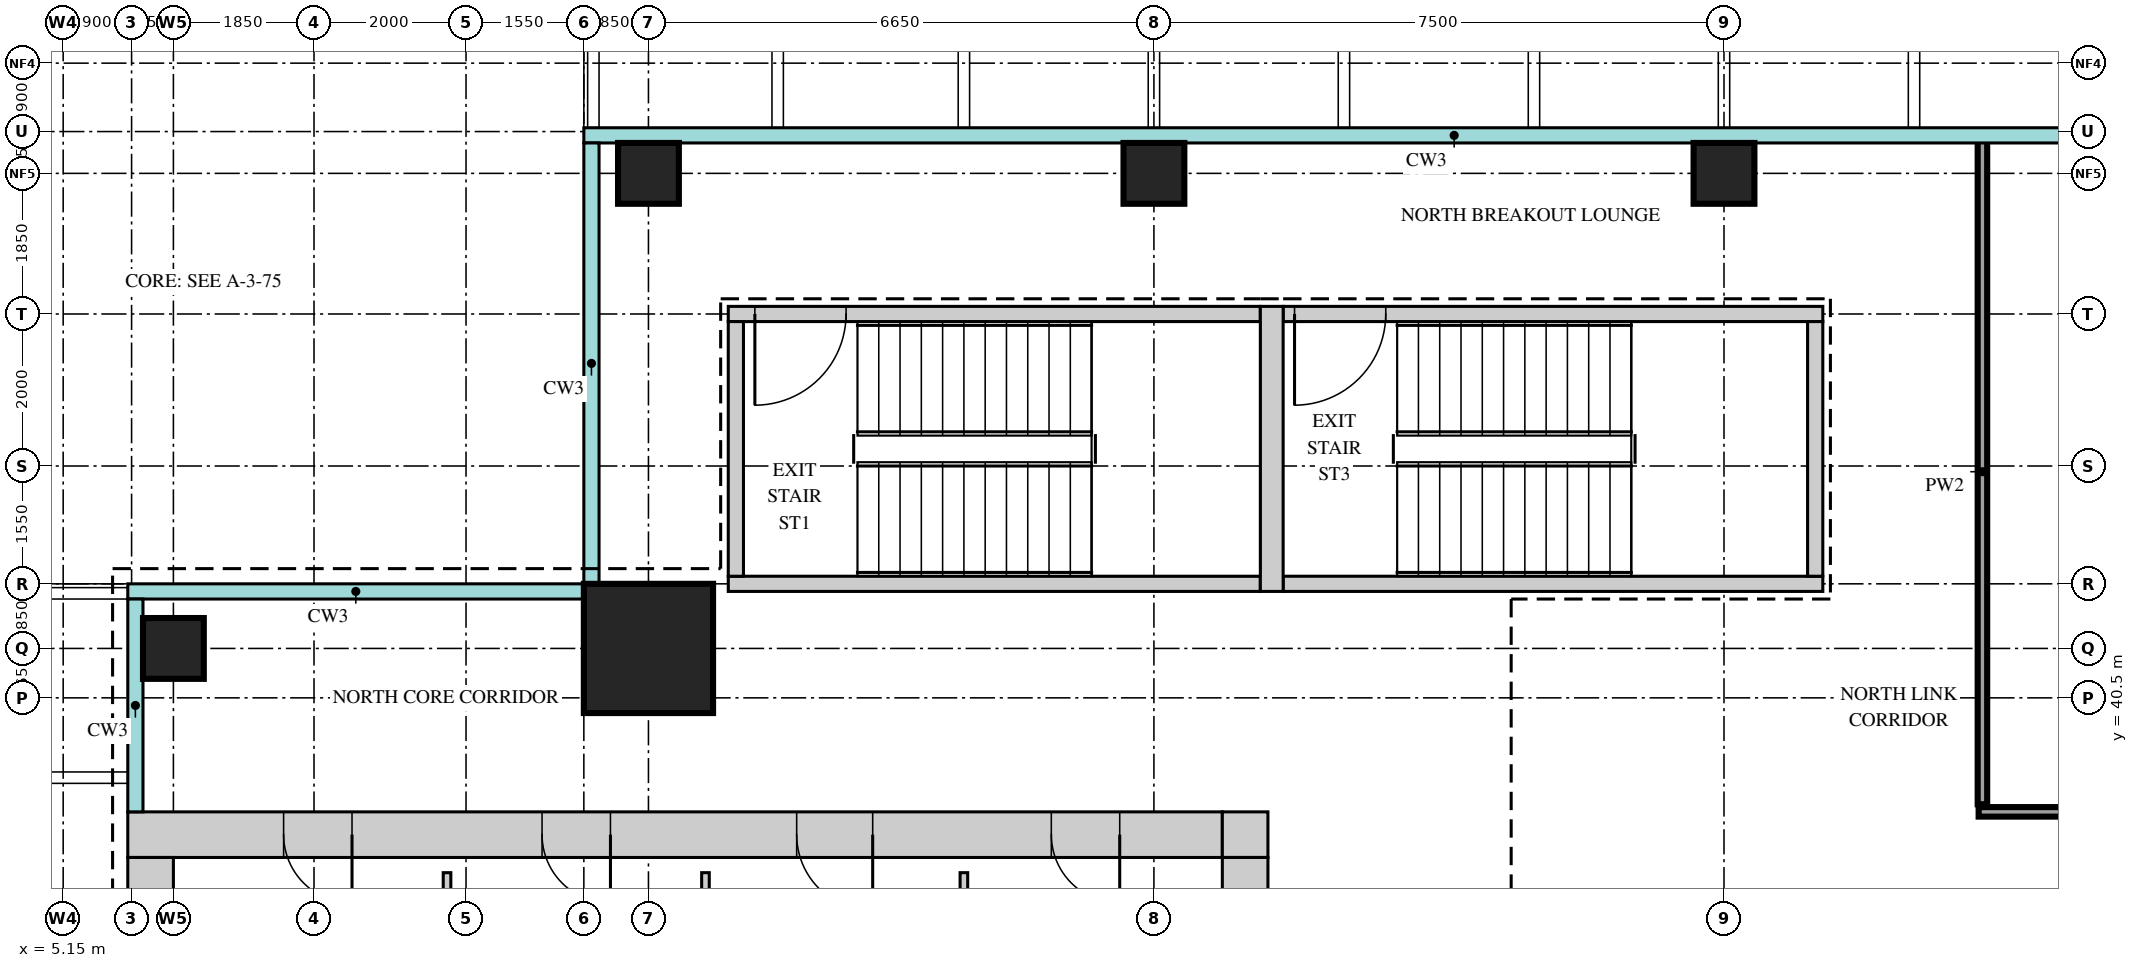
"""IFC4 building model, lengths in metres.
Left out: names, types, materials, properties, quantities, classifications, styles, units other than length and angle.
Written with IfcOpenShell. Run it as: python <this file> out.ifc"""

import sys

from ifc_helpers import new_model, si_unit, direction, frame, frame_2d, origin, origin_2d, place, context, subcontext, project, spatial, rectangle, extrude, source, transform, mapped, element, fill, save


model = new_model("IFC4")
c1 = context("Model", 3, precision=1e-05, world=origin(), true_north=direction((0.0, 1.0)))
c2 = subcontext(c1, "Body", "Model", "MODEL_VIEW")
j1 = project(units=[si_unit("LENGTHUNIT", "METRE"), si_unit("PLANEANGLEUNIT", "RADIAN")], contexts=[c1])
p1 = place(None, origin())
s1 = spatial("IfcSite", under=j1, at=p1, CompositionType="ELEMENT")
p2 = place(p1, origin())
s2 = spatial("IfcBuilding", under=s1, at=p2, CompositionType="ELEMENT")
p3 = place(p2, frame((0.0, 0.0, 318.2)))
s3 = spatial("IfcBuildingStorey", under=s2, at=p3, CompositionType="ELEMENT", Elevation=318.2)
m1 = source(origin(), c2, "Body", "SweptSolid", [
    extrude(rectangle(XDim=14.4, YDim=0.6, at=frame_2d((7.2, 0.0))), origin(), (0.0, 0.0, 1.0), 3.75),
])
p4 = place(p3, frame((6.0, 38.7, 0.0), z_axis=(0.0, 0.0, 1.0), x_axis=(1.0, 0.0, 0.0)))
e1 = element("IfcWall", 1, at=p4, inside=s3, PredefinedType="SHEAR", context=c2, shape_type="MappedRepresentation", body=[
    mapped(m1, transform((0.0, 0.0, 0.0))),
])
m2 = source(origin(), c2, "Body", "SweptSolid", [
    extrude(rectangle(XDim=0.9, YDim=2.1, at=frame_2d((0.45, 1.05))), frame((0.0, 0.31, 0.0), z_axis=(0.0, -1.0, 0.0), x_axis=(1.0, 0.0, 0.0)), (0.0, 0.0, 1.0), 0.62),
])
p5 = place(p4, frame((2.05, 0.0, 0.0)))
e2 = element("IfcOpeningElement", 2, at=p5, cuts=e1, PredefinedType="OPENING", context=c2, shape_type="MappedRepresentation", body=[
    mapped(m2, transform((0.0, 0.0, 0.0))),
])
p6 = place(p4, frame((5.45, 0.0, 0.0)))
e3 = element("IfcOpeningElement", 3, at=p6, cuts=e1, PredefinedType="OPENING", context=c2, shape_type="MappedRepresentation", body=[
    mapped(m2, transform((0.0, 0.0, 0.0))),
])
m3 = source(origin(), c2, "Body", "SweptSolid", [
    extrude(rectangle(XDim=1.0, YDim=2.1, at=frame_2d((0.5, 1.05))), frame((0.0, 0.31, 0.0), z_axis=(0.0, -1.0, 0.0), x_axis=(1.0, 0.0, 0.0)), (0.0, 0.0, 1.0), 0.62),
])
p7 = place(p4, frame((8.8, 0.0, 0.0)))
e4 = element("IfcOpeningElement", 4, at=p7, cuts=e1, PredefinedType="OPENING", context=c2, shape_type="MappedRepresentation", body=[
    mapped(m3, transform((0.0, 0.0, 0.0))),
])
p8 = place(p4, frame((12.15, 0.0, 0.0)))
e5 = element("IfcOpeningElement", 5, at=p8, cuts=e1, PredefinedType="OPENING", context=c2, shape_type="MappedRepresentation", body=[
    mapped(m2, transform((0.0, 0.0, 0.0))),
])
m4 = source(origin(), c2, "Body", "SweptSolid", [
    extrude(rectangle(XDim=0.6, YDim=0.6, at=frame_2d((0.3, 0.0))), origin(), (0.0, 0.0, 1.0), 3.75),
])
p9 = place(p3, frame((20.4, 38.7, 0.0), z_axis=(0.0, 0.0, 1.0), x_axis=(1.0, 0.0, 0.0)))
e6 = element("IfcWall", 6, at=p9, inside=s3, PredefinedType="SHEAR", context=c2, shape_type="MappedRepresentation", body=[
    mapped(m4, transform((0.0, 0.0, 0.0))),
])
m5 = source(origin(), c2, "Body", "SweptSolid", [
    extrude(rectangle(XDim=22.8, YDim=0.6, at=frame_2d((11.4, 0.0))), origin(), (0.0, 0.0, 1.0), 3.75),
])
p10 = place(p3, frame((20.7, 15.6, 0.0), z_axis=(0.0, 0.0, 1.0), x_axis=(0.0, 1.0, 0.0)))
e7 = element("IfcWall", 7, at=p10, inside=s3, PredefinedType="SHEAR", context=c2, shape_type="MappedRepresentation", body=[
    mapped(m5, transform((0.0, 0.0, 0.0))),
])
m6 = source(origin(), c2, "Body", "SweptSolid", [
    extrude(rectangle(XDim=1.8, YDim=2.1, at=frame_2d((0.9, 1.05))), frame((0.0, 0.31, 0.0), z_axis=(0.0, -1.0, 0.0), x_axis=(1.0, 0.0, 0.0)), (0.0, 0.0, 1.0), 0.62),
])
p11 = place(p10, frame((10.9, 0.0, 0.0)))
e8 = element("IfcOpeningElement", 8, at=p11, cuts=e7, PredefinedType="OPENING", context=c2, shape_type="MappedRepresentation", body=[
    mapped(m6, transform((0.0, 0.0, 0.0))),
])
p12 = place(p10, frame((0.55, 0.0, 0.0)))
e9 = element("IfcOpeningElement", 9, at=p12, cuts=e7, PredefinedType="OPENING", context=c2, shape_type="MappedRepresentation", body=[
    mapped(m2, transform((0.0, 0.0, 0.0))),
])
p13 = place(p10, frame((4.1, 0.0, 0.0)))
e10 = element("IfcOpeningElement", 10, at=p13, cuts=e7, PredefinedType="OPENING", context=c2, shape_type="MappedRepresentation", body=[
    mapped(m2, transform((0.0, 0.0, 0.0))),
])
p14 = place(p3, frame((6.3, 15.6, 0.0), z_axis=(0.0, 0.0, 1.0), x_axis=(0.0, 1.0, 0.0)))
e11 = element("IfcWall", 11, at=p14, inside=s3, PredefinedType="SHEAR", context=c2, shape_type="MappedRepresentation", body=[
    mapped(m5, transform((0.0, 0.0, 0.0))),
])
m7 = source(origin(), c2, "Body", "SweptSolid", [
    extrude(rectangle(XDim=7.0, YDim=0.2, at=frame_2d((3.5, 0.0))), origin(), (0.0, 0.0, 1.0), 3.75),
])
p15 = place(p3, frame((13.9, 45.55, 0.0), z_axis=(0.0, 0.0, 1.0), x_axis=(1.0, 0.0, 0.0)))
e12 = element("IfcWall", 12, at=p15, inside=s3, PredefinedType="SHEAR", context=c2, shape_type="MappedRepresentation", body=[
    mapped(m7, transform((0.0, 0.0, 0.0))),
])
m8 = source(origin(), c2, "Body", "SweptSolid", [
    extrude(rectangle(XDim=1.2, YDim=2.1, at=frame_2d((0.6, 1.05))), frame((0.0, 0.11, 0.0), z_axis=(0.0, -1.0, 0.0), x_axis=(1.0, 0.0, 0.0)), (0.0, 0.0, 1.0), 0.22),
])
p16 = place(p15, frame((0.35, 0.0, 0.0)))
e13 = element("IfcOpeningElement", 13, at=p16, cuts=e12, PredefinedType="OPENING", context=c2, shape_type="MappedRepresentation", body=[
    mapped(m8, transform((0.0, 0.0, 0.0))),
])
p17 = place(p3, frame((13.9, 42.0, 0.0), z_axis=(0.0, 0.0, 1.0), x_axis=(1.0, 0.0, 0.0)))
e14 = element("IfcWall", 14, at=p17, inside=s3, PredefinedType="SHEAR", context=c2, shape_type="MappedRepresentation", body=[
    mapped(m7, transform((0.0, 0.0, 0.0))),
])
m9 = source(origin(), c2, "Body", "SweptSolid", [
    extrude(rectangle(XDim=7.1, YDim=0.2, at=frame_2d((3.55, 0.0))), origin(), (0.0, 0.0, 1.0), 3.75),
])
p18 = place(p3, frame((21.2, 45.55, 0.0), z_axis=(0.0, 0.0, 1.0), x_axis=(1.0, 0.0, 0.0)))
e15 = element("IfcWall", 15, at=p18, inside=s3, PredefinedType="SHEAR", context=c2, shape_type="MappedRepresentation", body=[
    mapped(m9, transform((0.0, 0.0, 0.0))),
])
p19 = place(p18, frame((0.15, 0.0, 0.0)))
e16 = element("IfcOpeningElement", 16, at=p19, cuts=e15, PredefinedType="OPENING", context=c2, shape_type="MappedRepresentation", body=[
    mapped(m8, transform((0.0, 0.0, 0.0))),
])
p20 = place(p3, frame((21.2, 42.0, 0.0), z_axis=(0.0, 0.0, 1.0), x_axis=(1.0, 0.0, 0.0)))
e17 = element("IfcWall", 17, at=p20, inside=s3, PredefinedType="SHEAR", context=c2, shape_type="MappedRepresentation", body=[
    mapped(m9, transform((0.0, 0.0, 0.0))),
])
m10 = source(origin(), c2, "Body", "SweptSolid", [
    extrude(rectangle(XDim=3.75, YDim=0.3, at=frame_2d((1.875, 0.0))), origin(), (0.0, 0.0, 1.0), 3.75),
])
p21 = place(p3, frame((21.05, 41.9, 0.0), z_axis=(0.0, 0.0, 1.0), x_axis=(0.0, 1.0, 0.0)))
e18 = element("IfcWall", 18, at=p21, inside=s3, PredefinedType="SHEAR", context=c2, shape_type="MappedRepresentation", body=[
    mapped(m10, transform((0.0, 0.0, 0.0))),
])
m11 = source(origin(), c2, "Body", "SweptSolid", [
    extrude(rectangle(XDim=3.35, YDim=0.2, at=frame_2d((1.675, 0.0))), origin(), (0.0, 0.0, 1.0), 3.75),
])
for number, where, z_axis, x_axis in (
    (19, (14.0, 42.1, 0.0), (0.0, 0.0, 1.0), (0.0, 1.0, 0.0)),
    (20, (28.2, 42.1, 0.0), (0.0, 0.0, 1.0), (0.0, 1.0, 0.0)),
):
    element("IfcWall", number, at=place(p3, frame(where, z_axis=z_axis, x_axis=x_axis)), inside=s3, PredefinedType="SHEAR", context=c2, shape_type="MappedRepresentation", body=[
        mapped(m11, transform((0.0, 0.0, 0.0))),
    ])
m12 = source(origin(), c2, "Body", "SweptSolid", [
    extrude(rectangle(XDim=1.7, YDim=1.7, at=origin_2d()), origin(), (0.0, 0.0, 1.0), 3.75),
])
p22 = place(p3, frame((12.85, 41.15, 0.0), z_axis=(0.0, 0.0, 1.0), x_axis=(1.0, 0.0, 0.0)))
e21 = element("IfcColumn", 21, at=p22, inside=s3, PredefinedType="COLUMN", context=c2, shape_type="MappedRepresentation", body=[
    mapped(m12, transform((0.0, 0.0, 0.0))),
])
m13 = source(origin(), c2, "Body", "SweptSolid", [
    extrude(rectangle(XDim=0.8, YDim=0.8, at=origin_2d()), origin(), (0.0, 0.0, 1.0), 3.75),
])
for number, where, z_axis, x_axis in (
    (22, (12.85, 47.4, 0.0), (0.0, 0.0, 1.0), (1.0, 0.0, 0.0)),
    (23, (19.5, 47.4, 0.0), (0.0, 0.0, 1.0), (1.0, 0.0, 0.0)),
    (24, (27.0, 47.4, 0.0), (0.0, 0.0, 1.0), (1.0, 0.0, 0.0)),
    (25, (6.6, 41.15, 0.0), (0.0, 0.0, 1.0), (1.0, 0.0, 0.0)),
):
    element("IfcColumn", number, at=place(p3, frame(where, z_axis=z_axis, x_axis=x_axis)), inside=s3, PredefinedType="COLUMN", context=c2, shape_type="MappedRepresentation", body=[
        mapped(m13, transform((0.0, 0.0, 0.0))),
    ])
m14 = source(origin(), c2, "Body", "SweptSolid", [
    extrude(rectangle(XDim=6.0, YDim=0.1, at=frame_2d((3.0, 0.0))), origin(), (0.0, 0.0, 1.0), 3.8),
])
for number, where, z_axis, x_axis in (
    (26, (10.2, 32.2, 0.0), (0.0, 0.0, 1.0), (0.0, 1.0, 0.0)),
    (27, (13.6, 32.2, 0.0), (0.0, 0.0, 1.0), (0.0, 1.0, 0.0)),
):
    element("IfcWall", number, at=place(p3, frame(where, z_axis=z_axis, x_axis=x_axis)), inside=s3, PredefinedType="PARTITIONING", context=c2, shape_type="MappedRepresentation", body=[
        mapped(m14, transform((0.0, 0.0, 0.0))),
    ])
m15 = source(origin(), c2, "Body", "SweptSolid", [
    extrude(rectangle(XDim=5.95, YDim=0.1, at=frame_2d((2.975, 0.0))), origin(), (0.0, 0.0, 1.0), 3.8),
])
p23 = place(p3, frame((17.0, 32.25, 0.0), z_axis=(0.0, 0.0, 1.0), x_axis=(0.0, 1.0, 0.0)))
e28 = element("IfcWall", 28, at=p23, inside=s3, PredefinedType="PARTITIONING", context=c2, shape_type="MappedRepresentation", body=[
    mapped(m15, transform((0.0, 0.0, 0.0))),
])
m16 = source(origin(), c2, "Body", "SweptSolid", [
    extrude(rectangle(XDim=12.1, YDim=0.125, at=frame_2d((6.05, 0.0))), origin(), (0.0, 0.0, 1.0), 3.8),
])
p24 = place(p3, frame((30.35, 39.0, 0.0), z_axis=(0.0, 0.0, 1.0), x_axis=(1.0, 0.0, 0.0)))
e29 = element("IfcWall", 29, at=p24, inside=s3, PredefinedType="PARTITIONING", context=c2, shape_type="MappedRepresentation", body=[
    mapped(m16, transform((0.0, 0.0, 0.0))),
])
m17 = source(origin(), c2, "Body", "SweptSolid", [
    extrude(rectangle(XDim=1.2, YDim=2.1, at=frame_2d((0.6, 1.05))), frame((0.0, 0.073, 0.0), z_axis=(0.0, -1.0, 0.0), x_axis=(1.0, 0.0, 0.0)), (0.0, 0.0, 1.0), 0.145),
])
p25 = place(p24, frame((5.25, 0.0, 0.0)))
e30 = element("IfcOpeningElement", 30, at=p25, cuts=e29, PredefinedType="OPENING", context=c2, shape_type="MappedRepresentation", body=[
    mapped(m17, transform((0.0, 0.0, 0.0))),
])
m18 = source(origin(), c2, "Body", "SweptSolid", [
    extrude(rectangle(XDim=8.75, YDim=0.125, at=frame_2d((4.375, 0.0))), origin(), (0.0, 0.0, 1.0), 3.8),
])
p26 = place(p3, frame((30.4, 39.1, 0.0), z_axis=(0.0, 0.0, 1.0), x_axis=(0.0, 1.0, 0.0)))
e31 = element("IfcWall", 31, at=p26, inside=s3, PredefinedType="PARTITIONING", context=c2, shape_type="MappedRepresentation", body=[
    mapped(m18, transform((0.0, 0.0, 0.0))),
])
m19 = source(origin(), c2, "Body", "SweptSolid", [
    extrude(rectangle(XDim=0.9, YDim=2.1, at=frame_2d((0.45, 1.05))), frame((0.0, 0.25, 0.0), z_axis=(0.0, -1.0, 0.0), x_axis=(1.0, 0.0, 0.0)), (0.0, 0.0, 1.0), 0.5),
])
p27 = place(p5, origin())
e32 = element("IfcDoor", 32, at=p27, inside=s3, OperationType="SINGLE_SWING_RIGHT", PredefinedType="DOOR", context=c2, shape_type="MappedRepresentation", body=[
    mapped(m19, transform((0.0, 0.0, 0.0))),
])
fill(e2, e32)
p28 = place(p6, origin())
e33 = element("IfcDoor", 33, at=p28, inside=s3, OperationType="SINGLE_SWING_RIGHT", PredefinedType="DOOR", context=c2, shape_type="MappedRepresentation", body=[
    mapped(m19, transform((0.0, 0.0, 0.0))),
])
fill(e3, e33)
m20 = source(origin(), c2, "Body", "SweptSolid", [
    extrude(rectangle(XDim=1.0, YDim=2.1, at=frame_2d((0.5, 1.05))), frame((0.0, 0.25, 0.0), z_axis=(0.0, -1.0, 0.0), x_axis=(1.0, 0.0, 0.0)), (0.0, 0.0, 1.0), 0.5),
])
p29 = place(p7, origin())
e34 = element("IfcDoor", 34, at=p29, inside=s3, OperationType="SINGLE_SWING_RIGHT", PredefinedType="DOOR", context=c2, shape_type="MappedRepresentation", body=[
    mapped(m20, transform((0.0, 0.0, 0.0))),
])
fill(e4, e34)
p30 = place(p8, origin())
e35 = element("IfcDoor", 35, at=p30, inside=s3, OperationType="SINGLE_SWING_RIGHT", PredefinedType="DOOR", context=c2, shape_type="MappedRepresentation", body=[
    mapped(m19, transform((0.0, 0.0, 0.0))),
])
fill(e5, e35)
m21 = source(origin(), c2, "Body", "SweptSolid", [
    extrude(rectangle(XDim=1.2, YDim=2.1, at=frame_2d((0.6, 1.05))), frame((0.0, 0.025, 0.0), z_axis=(0.0, -1.0, 0.0), x_axis=(1.0, 0.0, 0.0)), (0.0, 0.0, 1.0), 0.05),
])
p31 = place(p16, origin())
e36 = element("IfcDoor", 36, at=p31, inside=s3, OperationType="SINGLE_SWING_LEFT", PredefinedType="DOOR", context=c2, shape_type="MappedRepresentation", body=[
    mapped(m21, transform((0.0, 0.0, 0.0))),
])
fill(e13, e36)
p32 = place(p19, origin())
e37 = element("IfcDoor", 37, at=p32, inside=s3, OperationType="SINGLE_SWING_LEFT", PredefinedType="DOOR", context=c2, shape_type="MappedRepresentation", body=[
    mapped(m21, transform((0.0, 0.0, 0.0))),
])
fill(e16, e37)
save(model, sys.argv[1])
